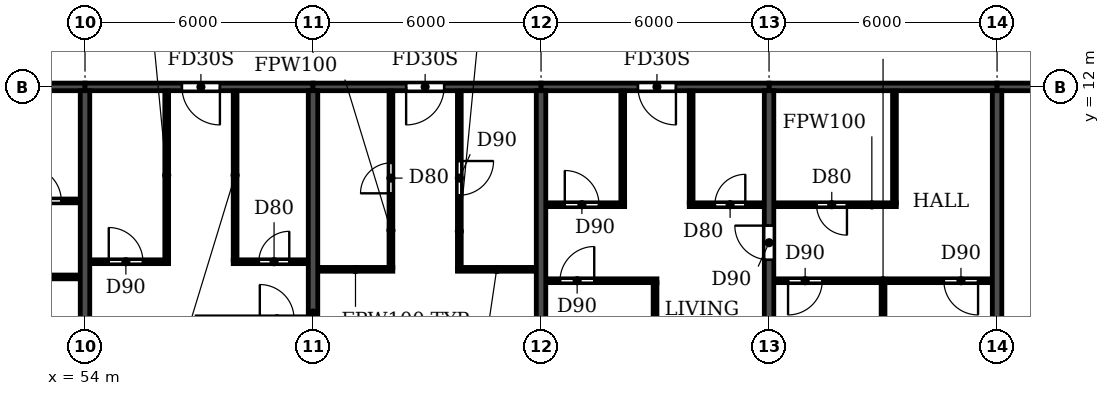
"""IFC4 building model, lengths in metres.
Left out: names, types, materials, properties, quantities, classifications, styles, units other than length and angle.
Written with IfcOpenShell. Run it as: python <this file> out.ifc"""

import sys

from ifc_helpers import new_model, si_unit, direction, frame, frame_2d, origin, place, context, subcontext, project, spatial, rectangle, extrude, element, fill, save


model = new_model("IFC4")
c1 = context("Model", 3, precision=1e-05, world=origin(), true_north=direction((0.0, 1.0)))
c2 = subcontext(c1, "Body", "Model", "MODEL_VIEW")
j1 = project(units=[si_unit("LENGTHUNIT", "METRE"), si_unit("PLANEANGLEUNIT", "RADIAN")], contexts=[c1])
p1 = place(None, origin())
s1 = spatial("IfcSite", under=j1, at=p1, CompositionType="ELEMENT")
p2 = place(p1, origin())
s2 = spatial("IfcBuilding", under=s1, at=p2, CompositionType="ELEMENT")
p3 = place(p2, frame((0.0, 0.0, 231.3)))
s3 = spatial("IfcBuildingStorey", under=s2, at=p3, CompositionType="ELEMENT", Elevation=231.3)
for number, where, z_axis, x_axis in (
    (1, (54.0, 0.2, 0.0), (0.0, 0.0, 1.0), (0.0, 1.0, 0.0)),
    (2, (60.0, 0.2, 0.0), (0.0, 0.0, 1.0), (0.0, 1.0, 0.0)),
    (3, (66.0, 0.2, 0.0), (0.0, 0.0, 1.0), (0.0, 1.0, 0.0)),
):
    element("IfcWall", number, at=place(p3, frame(where, z_axis=z_axis, x_axis=x_axis)), inside=s3, PredefinedType="SHEAR", context=c2, shape_type="SweptSolid", body=[
        extrude(rectangle(XDim=11.7, YDim=0.25, at=frame_2d((5.85, 0.0))), origin(), (0.0, 0.0, 1.0), 3.08),
    ])
p4 = place(p3, frame((72.0, 0.2, 0.0), z_axis=(0.0, 0.0, 1.0), x_axis=(0.0, 1.0, 0.0)))
e4 = element("IfcWall", 4, at=p4, inside=s3, PredefinedType="SHEAR", context=c2, shape_type="SweptSolid", body=[
    extrude(rectangle(XDim=11.7, YDim=0.25, at=frame_2d((5.85, 0.0))), origin(), (0.0, 0.0, 1.0), 3.08),
])
p5 = place(p4, frame((7.25, 0.0, 0.0)))
e5 = element("IfcOpeningElement", 5, at=p5, cuts=e4, PredefinedType="OPENING", context=c2, shape_type="SweptSolid", body=[
    extrude(rectangle(XDim=0.9, YDim=2.1, at=frame_2d((0.45, 1.05))), frame((0.0, 0.135, 0.0), z_axis=(0.0, -1.0, 0.0), x_axis=(1.0, 0.0, 0.0)), (0.0, 0.0, 1.0), 0.27),
])
p6 = place(p3, frame((78.0, 0.2, 0.0), z_axis=(0.0, 0.0, 1.0), x_axis=(0.0, 1.0, 0.0)))
e6 = element("IfcWall", 6, at=p6, inside=s3, PredefinedType="SHEAR", context=c2, shape_type="SweptSolid", body=[
    extrude(rectangle(XDim=11.7, YDim=0.25, at=frame_2d((5.85, 0.0))), origin(), (0.0, 0.0, 1.0), 3.08),
])
p7 = place(p3, frame((48.0, 12.0, 0.0), z_axis=(0.0, 0.0, 1.0), x_axis=(1.0, 0.0, 0.0)))
e7 = element("IfcWall", 7, at=p7, inside=s3, PredefinedType="SHEAR", context=c2, shape_type="SweptSolid", body=[
    extrude(rectangle(XDim=6.0, YDim=0.2, at=frame_2d((3.0, 0.0))), origin(), (0.0, 0.0, 1.0), 2.48),
])
p8 = place(p7, frame((2.45, 0.0, 0.0)))
e8 = element("IfcOpeningElement", 8, at=p8, cuts=e7, PredefinedType="OPENING", context=c2, shape_type="SweptSolid", body=[
    extrude(rectangle(XDim=1.0, YDim=2.1, at=frame_2d((0.5, 1.05))), frame((0.0, 0.11, 0.0), z_axis=(0.0, -1.0, 0.0), x_axis=(1.0, 0.0, 0.0)), (0.0, 0.0, 1.0), 0.22),
])
p9 = place(p3, frame((54.0, 12.0, 0.0), z_axis=(0.0, 0.0, 1.0), x_axis=(1.0, 0.0, 0.0)))
e9 = element("IfcWall", 9, at=p9, inside=s3, PredefinedType="SHEAR", context=c2, shape_type="SweptSolid", body=[
    extrude(rectangle(XDim=6.0, YDim=0.2, at=frame_2d((3.0, 0.0))), origin(), (0.0, 0.0, 1.0), 2.48),
])
p10 = place(p9, frame((2.55, 0.0, 0.0)))
e10 = element("IfcOpeningElement", 10, at=p10, cuts=e9, PredefinedType="OPENING", context=c2, shape_type="SweptSolid", body=[
    extrude(rectangle(XDim=1.0, YDim=2.1, at=frame_2d((0.5, 1.05))), frame((0.0, 0.11, 0.0), z_axis=(0.0, -1.0, 0.0), x_axis=(1.0, 0.0, 0.0)), (0.0, 0.0, 1.0), 0.22),
])
p11 = place(p3, frame((60.0, 12.0, 0.0), z_axis=(0.0, 0.0, 1.0), x_axis=(1.0, 0.0, 0.0)))
e11 = element("IfcWall", 11, at=p11, inside=s3, PredefinedType="SHEAR", context=c2, shape_type="SweptSolid", body=[
    extrude(rectangle(XDim=6.0, YDim=0.2, at=frame_2d((3.0, 0.0))), origin(), (0.0, 0.0, 1.0), 2.48),
])
p12 = place(p11, frame((2.45, 0.0, 0.0)))
e12 = element("IfcOpeningElement", 12, at=p12, cuts=e11, PredefinedType="OPENING", context=c2, shape_type="SweptSolid", body=[
    extrude(rectangle(XDim=1.0, YDim=2.1, at=frame_2d((0.5, 1.05))), frame((0.0, 0.11, 0.0), z_axis=(0.0, -1.0, 0.0), x_axis=(1.0, 0.0, 0.0)), (0.0, 0.0, 1.0), 0.22),
])
p13 = place(p3, frame((66.0, 12.0, 0.0), z_axis=(0.0, 0.0, 1.0), x_axis=(1.0, 0.0, 0.0)))
e13 = element("IfcWall", 13, at=p13, inside=s3, PredefinedType="SHEAR", context=c2, shape_type="SweptSolid", body=[
    extrude(rectangle(XDim=6.0, YDim=0.2, at=frame_2d((3.0, 0.0))), origin(), (0.0, 0.0, 1.0), 2.48),
])
p14 = place(p13, frame((2.55, 0.0, 0.0)))
e14 = element("IfcOpeningElement", 14, at=p14, cuts=e13, PredefinedType="OPENING", context=c2, shape_type="SweptSolid", body=[
    extrude(rectangle(XDim=1.0, YDim=2.1, at=frame_2d((0.5, 1.05))), frame((0.0, 0.11, 0.0), z_axis=(0.0, -1.0, 0.0), x_axis=(1.0, 0.0, 0.0)), (0.0, 0.0, 1.0), 0.22),
])
p15 = place(p3, frame((72.0, 12.0, 0.0), z_axis=(0.0, 0.0, 1.0), x_axis=(1.0, 0.0, 0.0)))
e15 = element("IfcWall", 15, at=p15, inside=s3, PredefinedType="SHEAR", context=c2, shape_type="SweptSolid", body=[
    extrude(rectangle(XDim=6.0, YDim=0.2, at=frame_2d((3.0, 0.0))), origin(), (0.0, 0.0, 1.0), 2.48),
])
p16 = place(p3, frame((78.0, 12.0, 0.0), z_axis=(0.0, 0.0, 1.0), x_axis=(1.0, 0.0, 0.0)))
e16 = element("IfcWall", 16, at=p16, inside=s3, PredefinedType="SHEAR", context=c2, shape_type="SweptSolid", body=[
    extrude(rectangle(XDim=5.8, YDim=0.2, at=frame_2d((2.9, 0.0))), origin(), (0.0, 0.0, 1.0), 2.48),
])
p17 = place(p16, frame((2.5, 0.0, 0.0)))
e17 = element("IfcOpeningElement", 17, at=p17, cuts=e16, PredefinedType="OPENING", context=c2, shape_type="SweptSolid", body=[
    extrude(rectangle(XDim=1.0, YDim=2.1, at=frame_2d((0.5, 1.05))), frame((0.0, 0.11, 0.0), z_axis=(0.0, -1.0, 0.0), x_axis=(1.0, 0.0, 0.0)), (0.0, 0.0, 1.0), 0.22),
])
p18 = place(p3, frame((66.135, 6.9, 0.0), z_axis=(0.0, 0.0, 1.0), x_axis=(1.0, 0.0, 0.0)))
e18 = element("IfcWall", 18, at=p18, inside=s3, PredefinedType="PARTITIONING", context=c2, shape_type="SweptSolid", body=[
    extrude(rectangle(XDim=2.915, YDim=0.1, at=frame_2d((1.458, 0.0))), origin(), (0.0, 0.0, 1.0), 3.08),
])
p19 = place(p18, frame((0.365, 0.0, 0.0)))
e19 = element("IfcOpeningElement", 19, at=p19, cuts=e18, PredefinedType="OPENING", context=c2, shape_type="SweptSolid", body=[
    extrude(rectangle(XDim=0.9, YDim=2.1, at=frame_2d((0.45, 1.05))), frame((0.0, 0.06, 0.0), z_axis=(0.0, -1.0, 0.0), x_axis=(1.0, 0.0, 0.0)), (0.0, 0.0, 1.0), 0.12),
])
p20 = place(p3, frame((72.135, 6.9, 0.0), z_axis=(0.0, 0.0, 1.0), x_axis=(1.0, 0.0, 0.0)))
e20 = element("IfcWall", 20, at=p20, inside=s3, PredefinedType="PARTITIONING", context=c2, shape_type="SweptSolid", body=[
    extrude(rectangle(XDim=5.73, YDim=0.1, at=frame_2d((2.865, 0.0))), origin(), (0.0, 0.0, 1.0), 3.08),
])
p21 = place(p20, frame((0.365, 0.0, 0.0)))
e21 = element("IfcOpeningElement", 21, at=p21, cuts=e20, PredefinedType="OPENING", context=c2, shape_type="SweptSolid", body=[
    extrude(rectangle(XDim=0.9, YDim=2.1, at=frame_2d((0.45, 1.05))), frame((0.0, 0.06, 0.0), z_axis=(0.0, -1.0, 0.0), x_axis=(1.0, 0.0, 0.0)), (0.0, 0.0, 1.0), 0.12),
])
p22 = place(p20, frame((4.465, 0.0, 0.0)))
e22 = element("IfcOpeningElement", 22, at=p22, cuts=e20, PredefinedType="OPENING", context=c2, shape_type="SweptSolid", body=[
    extrude(rectangle(XDim=0.9, YDim=2.1, at=frame_2d((0.45, 1.05))), frame((0.0, 0.06, 0.0), z_axis=(0.0, -1.0, 0.0), x_axis=(1.0, 0.0, 0.0)), (0.0, 0.0, 1.0), 0.12),
])
p23 = place(p3, frame((50.95, 7.0, 0.0), z_axis=(0.0, 0.0, 1.0), x_axis=(1.0, 0.0, 0.0)))
e23 = element("IfcWall", 23, at=p23, inside=s3, PredefinedType="PARTITIONING", context=c2, shape_type="SweptSolid", body=[
    extrude(rectangle(XDim=2.915, YDim=0.1, at=frame_2d((1.458, 0.0))), origin(), (0.0, 0.0, 1.0), 3.08),
])
p24 = place(p23, frame((0.55, 0.0, 0.0)))
e24 = element("IfcOpeningElement", 24, at=p24, cuts=e23, PredefinedType="OPENING", context=c2, shape_type="SweptSolid", body=[
    extrude(rectangle(XDim=0.9, YDim=2.1, at=frame_2d((0.45, 1.05))), frame((0.0, 0.06, 0.0), z_axis=(0.0, -1.0, 0.0), x_axis=(1.0, 0.0, 0.0)), (0.0, 0.0, 1.0), 0.12),
])
p25 = place(p3, frame((60.135, 7.2, 0.0), z_axis=(0.0, 0.0, 1.0), x_axis=(1.0, 0.0, 0.0)))
e25 = element("IfcWall", 25, at=p25, inside=s3, PredefinedType="PARTITIONING", context=c2, shape_type="SweptSolid", body=[
    extrude(rectangle(XDim=1.965, YDim=0.1, at=frame_2d((0.982, 0.0))), origin(), (0.0, 0.0, 1.0), 3.08),
])
p26 = place(p3, frame((63.8, 7.2, 0.0), z_axis=(0.0, 0.0, 1.0), x_axis=(1.0, 0.0, 0.0)))
e26 = element("IfcWall", 26, at=p26, inside=s3, PredefinedType="PARTITIONING", context=c2, shape_type="SweptSolid", body=[
    extrude(rectangle(XDim=2.065, YDim=0.1, at=frame_2d((1.032, 0.0))), origin(), (0.0, 0.0, 1.0), 3.08),
])
p27 = place(p3, frame((54.135, 7.4, 0.0), z_axis=(0.0, 0.0, 1.0), x_axis=(1.0, 0.0, 0.0)))
e27 = element("IfcWall", 27, at=p27, inside=s3, PredefinedType="PARTITIONING", context=c2, shape_type="SweptSolid", body=[
    extrude(rectangle(XDim=2.065, YDim=0.1, at=frame_2d((1.032, 0.0))), origin(), (0.0, 0.0, 1.0), 3.08),
])
p28 = place(p27, frame((0.49, 0.0, 0.0)))
e28 = element("IfcOpeningElement", 28, at=p28, cuts=e27, PredefinedType="OPENING", context=c2, shape_type="SweptSolid", body=[
    extrude(rectangle(XDim=0.9, YDim=2.1, at=frame_2d((0.45, 1.05))), frame((0.0, 0.06, 0.0), z_axis=(0.0, -1.0, 0.0), x_axis=(1.0, 0.0, 0.0)), (0.0, 0.0, 1.0), 0.12),
])
p29 = place(p3, frame((57.9, 7.4, 0.0), z_axis=(0.0, 0.0, 1.0), x_axis=(1.0, 0.0, 0.0)))
e29 = element("IfcWall", 29, at=p29, inside=s3, PredefinedType="PARTITIONING", context=c2, shape_type="SweptSolid", body=[
    extrude(rectangle(XDim=1.965, YDim=0.1, at=frame_2d((0.982, 0.0))), origin(), (0.0, 0.0, 1.0), 3.08),
])
p30 = place(p29, frame((0.675, 0.0, 0.0)))
e30 = element("IfcOpeningElement", 30, at=p30, cuts=e29, PredefinedType="OPENING", context=c2, shape_type="SweptSolid", body=[
    extrude(rectangle(XDim=0.8, YDim=2.1, at=frame_2d((0.4, 1.05))), frame((0.0, 0.06, 0.0), z_axis=(0.0, -1.0, 0.0), x_axis=(1.0, 0.0, 0.0)), (0.0, 0.0, 1.0), 0.12),
])
p31 = place(p3, frame((66.135, 8.9, 0.0), z_axis=(0.0, 0.0, 1.0), x_axis=(1.0, 0.0, 0.0)))
e31 = element("IfcWall", 31, at=p31, inside=s3, PredefinedType="PARTITIONING", context=c2, shape_type="SweptSolid", body=[
    extrude(rectangle(XDim=2.065, YDim=0.1, at=frame_2d((1.032, 0.0))), origin(), (0.0, 0.0, 1.0), 3.08),
])
p32 = place(p31, frame((0.49, 0.0, 0.0)))
e32 = element("IfcOpeningElement", 32, at=p32, cuts=e31, PredefinedType="OPENING", context=c2, shape_type="SweptSolid", body=[
    extrude(rectangle(XDim=0.9, YDim=2.1, at=frame_2d((0.45, 1.05))), frame((0.0, 0.06, 0.0), z_axis=(0.0, -1.0, 0.0), x_axis=(1.0, 0.0, 0.0)), (0.0, 0.0, 1.0), 0.12),
])
p33 = place(p3, frame((69.9, 8.9, 0.0), z_axis=(0.0, 0.0, 1.0), x_axis=(1.0, 0.0, 0.0)))
e33 = element("IfcWall", 33, at=p33, inside=s3, PredefinedType="PARTITIONING", context=c2, shape_type="SweptSolid", body=[
    extrude(rectangle(XDim=1.965, YDim=0.1, at=frame_2d((0.982, 0.0))), origin(), (0.0, 0.0, 1.0), 3.08),
])
p34 = place(p33, frame((0.675, 0.0, 0.0)))
e34 = element("IfcOpeningElement", 34, at=p34, cuts=e33, PredefinedType="OPENING", context=c2, shape_type="SweptSolid", body=[
    extrude(rectangle(XDim=0.8, YDim=2.1, at=frame_2d((0.4, 1.05))), frame((0.0, 0.06, 0.0), z_axis=(0.0, -1.0, 0.0), x_axis=(1.0, 0.0, 0.0)), (0.0, 0.0, 1.0), 0.12),
])
p35 = place(p3, frame((72.135, 8.9, 0.0), z_axis=(0.0, 0.0, 1.0), x_axis=(1.0, 0.0, 0.0)))
e35 = element("IfcWall", 35, at=p35, inside=s3, PredefinedType="PARTITIONING", context=c2, shape_type="SweptSolid", body=[
    extrude(rectangle(XDim=3.215, YDim=0.1, at=frame_2d((1.607, 0.0))), origin(), (0.0, 0.0, 1.0), 3.08),
])
p36 = place(p35, frame((1.115, 0.0, 0.0)))
e36 = element("IfcOpeningElement", 36, at=p36, cuts=e35, PredefinedType="OPENING", context=c2, shape_type="SweptSolid", body=[
    extrude(rectangle(XDim=0.8, YDim=2.1, at=frame_2d((0.4, 1.05))), frame((0.0, 0.06, 0.0), z_axis=(0.0, -1.0, 0.0), x_axis=(1.0, 0.0, 0.0)), (0.0, 0.0, 1.0), 0.12),
])
p37 = place(p3, frame((51.8, 9.0, 0.0), z_axis=(0.0, 0.0, 1.0), x_axis=(1.0, 0.0, 0.0)))
e37 = element("IfcWall", 37, at=p37, inside=s3, PredefinedType="PARTITIONING", context=c2, shape_type="SweptSolid", body=[
    extrude(rectangle(XDim=2.065, YDim=0.1, at=frame_2d((1.032, 0.0))), origin(), (0.0, 0.0, 1.0), 3.08),
])
p38 = place(p37, frame((0.675, 0.0, 0.0)))
e38 = element("IfcOpeningElement", 38, at=p38, cuts=e37, PredefinedType="OPENING", context=c2, shape_type="SweptSolid", body=[
    extrude(rectangle(XDim=0.9, YDim=2.1, at=frame_2d((0.45, 1.05))), frame((0.0, 0.06, 0.0), z_axis=(0.0, -1.0, 0.0), x_axis=(1.0, 0.0, 0.0)), (0.0, 0.0, 1.0), 0.12),
])
for number, where, z_axis, x_axis in (
    (39, (56.15, 7.45, 0.0), (0.0, 0.0, 1.0), (0.0, 1.0, 0.0)),
    (40, (57.95, 7.45, 0.0), (0.0, 0.0, 1.0), (0.0, 1.0, 0.0)),
):
    element("IfcWall", number, at=place(p3, frame(where, z_axis=z_axis, x_axis=x_axis)), inside=s3, PredefinedType="PARTITIONING", context=c2, shape_type="SweptSolid", body=[
        extrude(rectangle(XDim=4.44, YDim=0.1, at=frame_2d((2.22, 0.0))), origin(), (0.0, 0.0, 1.0), 3.08),
    ])
p39 = place(p3, frame((62.05, 7.25, 0.0), z_axis=(0.0, 0.0, 1.0), x_axis=(0.0, 1.0, 0.0)))
e41 = element("IfcWall", 41, at=p39, inside=s3, PredefinedType="PARTITIONING", context=c2, shape_type="SweptSolid", body=[
    extrude(rectangle(XDim=4.64, YDim=0.1, at=frame_2d((2.32, 0.0))), origin(), (0.0, 0.0, 1.0), 3.08),
])
p40 = place(p39, frame((1.95, 0.0, 0.0)))
e42 = element("IfcOpeningElement", 42, at=p40, cuts=e41, PredefinedType="OPENING", context=c2, shape_type="SweptSolid", body=[
    extrude(rectangle(XDim=0.8, YDim=2.1, at=frame_2d((0.4, 1.05))), frame((0.0, 0.06, 0.0), z_axis=(0.0, -1.0, 0.0), x_axis=(1.0, 0.0, 0.0)), (0.0, 0.0, 1.0), 0.12),
])
p41 = place(p3, frame((63.85, 7.25, 0.0), z_axis=(0.0, 0.0, 1.0), x_axis=(0.0, 1.0, 0.0)))
e43 = element("IfcWall", 43, at=p41, inside=s3, PredefinedType="PARTITIONING", context=c2, shape_type="SweptSolid", body=[
    extrude(rectangle(XDim=4.64, YDim=0.1, at=frame_2d((2.32, 0.0))), origin(), (0.0, 0.0, 1.0), 3.08),
])
p42 = place(p41, frame((1.9, 0.0, 0.0)))
e44 = element("IfcOpeningElement", 44, at=p42, cuts=e43, PredefinedType="OPENING", context=c2, shape_type="SweptSolid", body=[
    extrude(rectangle(XDim=0.9, YDim=2.1, at=frame_2d((0.45, 1.05))), frame((0.0, 0.06, 0.0), z_axis=(0.0, -1.0, 0.0), x_axis=(1.0, 0.0, 0.0)), (0.0, 0.0, 1.0), 0.12),
])
p43 = place(p3, frame((68.15, 8.95, 0.0), z_axis=(0.0, 0.0, 1.0), x_axis=(0.0, 1.0, 0.0)))
e45 = element("IfcWall", 45, at=p43, inside=s3, PredefinedType="PARTITIONING", context=c2, shape_type="SweptSolid", body=[
    extrude(rectangle(XDim=2.94, YDim=0.1, at=frame_2d((1.47, 0.0))), origin(), (0.0, 0.0, 1.0), 3.08),
])
p44 = place(p3, frame((69.0, 0.06, 0.0), z_axis=(0.0, 0.0, 1.0), x_axis=(0.0, 1.0, 0.0)))
e46 = element("IfcWall", 46, at=p44, inside=s3, PredefinedType="PARTITIONING", context=c2, shape_type="SweptSolid", body=[
    extrude(rectangle(XDim=6.79, YDim=0.1, at=frame_2d((3.395, 0.0))), origin(), (0.0, 0.0, 1.0), 3.08),
])
p45 = place(p3, frame((69.95, 8.95, 0.0), z_axis=(0.0, 0.0, 1.0), x_axis=(0.0, 1.0, 0.0)))
e47 = element("IfcWall", 47, at=p45, inside=s3, PredefinedType="PARTITIONING", context=c2, shape_type="SweptSolid", body=[
    extrude(rectangle(XDim=2.94, YDim=0.1, at=frame_2d((1.47, 0.0))), origin(), (0.0, 0.0, 1.0), 3.08),
])
p46 = place(p3, frame((75.0, 0.06, 0.0), z_axis=(0.0, 0.0, 1.0), x_axis=(0.0, 1.0, 0.0)))
e48 = element("IfcWall", 48, at=p46, inside=s3, PredefinedType="PARTITIONING", context=c2, shape_type="SweptSolid", body=[
    extrude(rectangle(XDim=6.79, YDim=0.1, at=frame_2d((3.395, 0.0))), origin(), (0.0, 0.0, 1.0), 3.08),
])
p47 = place(p3, frame((75.3, 8.95, 0.0), z_axis=(0.0, 0.0, 1.0), x_axis=(0.0, 1.0, 0.0)))
e49 = element("IfcWall", 49, at=p47, inside=s3, PredefinedType="PARTITIONING", context=c2, shape_type="SweptSolid", body=[
    extrude(rectangle(XDim=2.94, YDim=0.1, at=frame_2d((1.47, 0.0))), origin(), (0.0, 0.0, 1.0), 3.08),
])
p48 = place(p38, origin())
e50 = element("IfcDoor", 50, at=p48, inside=s3, OperationType="SINGLE_SWING_LEFT", PredefinedType="DOOR", context=c2, shape_type="SweptSolid", body=[
    extrude(rectangle(XDim=0.9, YDim=2.1, at=frame_2d((0.45, 1.05))), frame((0.0, 0.025, 0.0), z_axis=(0.0, -1.0, 0.0), x_axis=(1.0, 0.0, 0.0)), (0.0, 0.0, 1.0), 0.05),
])
fill(e38, e50)
p49 = place(p28, origin())
e51 = element("IfcDoor", 51, at=p49, inside=s3, OperationType="SINGLE_SWING_LEFT", PredefinedType="DOOR", context=c2, shape_type="SweptSolid", body=[
    extrude(rectangle(XDim=0.9, YDim=2.1, at=frame_2d((0.45, 1.05))), frame((0.0, 0.025, 0.0), z_axis=(0.0, -1.0, 0.0), x_axis=(1.0, 0.0, 0.0)), (0.0, 0.0, 1.0), 0.05),
])
fill(e28, e51)
p50 = place(p10, frame((1.0, 0.0, 0.0), z_axis=(0.0, 0.0, 1.0), x_axis=(-1.0, 0.0, 0.0)))
e52 = element("IfcDoor", 52, at=p50, inside=s3, OperationType="SINGLE_SWING_LEFT", PredefinedType="DOOR", context=c2, shape_type="SweptSolid", body=[
    extrude(rectangle(XDim=1.0, YDim=2.1, at=frame_2d((0.5, 1.05))), frame((0.0, 0.025, 0.0), z_axis=(0.0, -1.0, 0.0), x_axis=(1.0, 0.0, 0.0)), (0.0, 0.0, 1.0), 0.05),
])
fill(e10, e52)
p51 = place(p30, origin())
e53 = element("IfcDoor", 53, at=p51, inside=s3, OperationType="SINGLE_SWING_RIGHT", PredefinedType="DOOR", context=c2, shape_type="SweptSolid", body=[
    extrude(rectangle(XDim=0.8, YDim=2.1, at=frame_2d((0.4, 1.05))), frame((0.0, 0.025, 0.0), z_axis=(0.0, -1.0, 0.0), x_axis=(1.0, 0.0, 0.0)), (0.0, 0.0, 1.0), 0.05),
])
fill(e30, e53)
p52 = place(p40, origin())
e54 = element("IfcDoor", 54, at=p52, inside=s3, OperationType="SINGLE_SWING_LEFT", PredefinedType="DOOR", context=c2, shape_type="SweptSolid", body=[
    extrude(rectangle(XDim=0.8, YDim=2.1, at=frame_2d((0.4, 1.05))), frame((0.0, 0.025, 0.0), z_axis=(0.0, -1.0, 0.0), x_axis=(1.0, 0.0, 0.0)), (0.0, 0.0, 1.0), 0.05),
])
fill(e42, e54)
p53 = place(p12, frame((1.0, 0.0, 0.0), z_axis=(0.0, 0.0, 1.0), x_axis=(-1.0, 0.0, 0.0)))
e55 = element("IfcDoor", 55, at=p53, inside=s3, OperationType="SINGLE_SWING_RIGHT", PredefinedType="DOOR", context=c2, shape_type="SweptSolid", body=[
    extrude(rectangle(XDim=1.0, YDim=2.1, at=frame_2d((0.5, 1.05))), frame((0.0, 0.025, 0.0), z_axis=(0.0, -1.0, 0.0), x_axis=(1.0, 0.0, 0.0)), (0.0, 0.0, 1.0), 0.05),
])
fill(e12, e55)
p54 = place(p42, frame((0.9, 0.0, 0.0), z_axis=(0.0, 0.0, 1.0), x_axis=(-1.0, 0.0, 0.0)))
e56 = element("IfcDoor", 56, at=p54, inside=s3, OperationType="SINGLE_SWING_LEFT", PredefinedType="DOOR", context=c2, shape_type="SweptSolid", body=[
    extrude(rectangle(XDim=0.9, YDim=2.1, at=frame_2d((0.45, 1.05))), frame((0.0, 0.025, 0.0), z_axis=(0.0, -1.0, 0.0), x_axis=(1.0, 0.0, 0.0)), (0.0, 0.0, 1.0), 0.05),
])
fill(e44, e56)
p55 = place(p21, frame((0.9, 0.0, 0.0), z_axis=(0.0, 0.0, 1.0), x_axis=(-1.0, 0.0, 0.0)))
e57 = element("IfcDoor", 57, at=p55, inside=s3, OperationType="SINGLE_SWING_RIGHT", PredefinedType="DOOR", context=c2, shape_type="SweptSolid", body=[
    extrude(rectangle(XDim=0.9, YDim=2.1, at=frame_2d((0.45, 1.05))), frame((0.0, 0.025, 0.0), z_axis=(0.0, -1.0, 0.0), x_axis=(1.0, 0.0, 0.0)), (0.0, 0.0, 1.0), 0.05),
])
fill(e21, e57)
p56 = place(p36, frame((0.8, 0.0, 0.0), z_axis=(0.0, 0.0, 1.0), x_axis=(-1.0, 0.0, 0.0)))
e58 = element("IfcDoor", 58, at=p56, inside=s3, OperationType="SINGLE_SWING_LEFT", PredefinedType="DOOR", context=c2, shape_type="SweptSolid", body=[
    extrude(rectangle(XDim=0.8, YDim=2.1, at=frame_2d((0.4, 1.05))), frame((0.0, 0.025, 0.0), z_axis=(0.0, -1.0, 0.0), x_axis=(1.0, 0.0, 0.0)), (0.0, 0.0, 1.0), 0.05),
])
fill(e36, e58)
p57 = place(p22, frame((0.9, 0.0, 0.0), z_axis=(0.0, 0.0, 1.0), x_axis=(-1.0, 0.0, 0.0)))
e59 = element("IfcDoor", 59, at=p57, inside=s3, OperationType="SINGLE_SWING_LEFT", PredefinedType="DOOR", context=c2, shape_type="SweptSolid", body=[
    extrude(rectangle(XDim=0.9, YDim=2.1, at=frame_2d((0.45, 1.05))), frame((0.0, 0.025, 0.0), z_axis=(0.0, -1.0, 0.0), x_axis=(1.0, 0.0, 0.0)), (0.0, 0.0, 1.0), 0.05),
])
fill(e22, e59)
p58 = place(p19, origin())
e60 = element("IfcDoor", 60, at=p58, inside=s3, OperationType="SINGLE_SWING_RIGHT", PredefinedType="DOOR", context=c2, shape_type="SweptSolid", body=[
    extrude(rectangle(XDim=0.9, YDim=2.1, at=frame_2d((0.45, 1.05))), frame((0.0, 0.025, 0.0), z_axis=(0.0, -1.0, 0.0), x_axis=(1.0, 0.0, 0.0)), (0.0, 0.0, 1.0), 0.05),
])
fill(e19, e60)
p59 = place(p32, origin())
e61 = element("IfcDoor", 61, at=p59, inside=s3, OperationType="SINGLE_SWING_LEFT", PredefinedType="DOOR", context=c2, shape_type="SweptSolid", body=[
    extrude(rectangle(XDim=0.9, YDim=2.1, at=frame_2d((0.45, 1.05))), frame((0.0, 0.025, 0.0), z_axis=(0.0, -1.0, 0.0), x_axis=(1.0, 0.0, 0.0)), (0.0, 0.0, 1.0), 0.05),
])
fill(e32, e61)
p60 = place(p14, frame((1.0, 0.0, 0.0), z_axis=(0.0, 0.0, 1.0), x_axis=(-1.0, 0.0, 0.0)))
e62 = element("IfcDoor", 62, at=p60, inside=s3, OperationType="SINGLE_SWING_LEFT", PredefinedType="DOOR", context=c2, shape_type="SweptSolid", body=[
    extrude(rectangle(XDim=1.0, YDim=2.1, at=frame_2d((0.5, 1.05))), frame((0.0, 0.025, 0.0), z_axis=(0.0, -1.0, 0.0), x_axis=(1.0, 0.0, 0.0)), (0.0, 0.0, 1.0), 0.05),
])
fill(e14, e62)
p61 = place(p34, origin())
e63 = element("IfcDoor", 63, at=p61, inside=s3, OperationType="SINGLE_SWING_RIGHT", PredefinedType="DOOR", context=c2, shape_type="SweptSolid", body=[
    extrude(rectangle(XDim=0.8, YDim=2.1, at=frame_2d((0.4, 1.05))), frame((0.0, 0.025, 0.0), z_axis=(0.0, -1.0, 0.0), x_axis=(1.0, 0.0, 0.0)), (0.0, 0.0, 1.0), 0.05),
])
fill(e34, e63)
p62 = place(p5, origin())
e64 = element("IfcDoor", 64, at=p62, inside=s3, OperationType="SINGLE_SWING_RIGHT", PredefinedType="DOOR", context=c2, shape_type="SweptSolid", body=[
    extrude(rectangle(XDim=0.9, YDim=2.1, at=frame_2d((0.45, 1.05))), frame((0.0, 0.025, 0.0), z_axis=(0.0, -1.0, 0.0), x_axis=(1.0, 0.0, 0.0)), (0.0, 0.0, 1.0), 0.05),
])
fill(e5, e64)
save(model, sys.argv[1])
